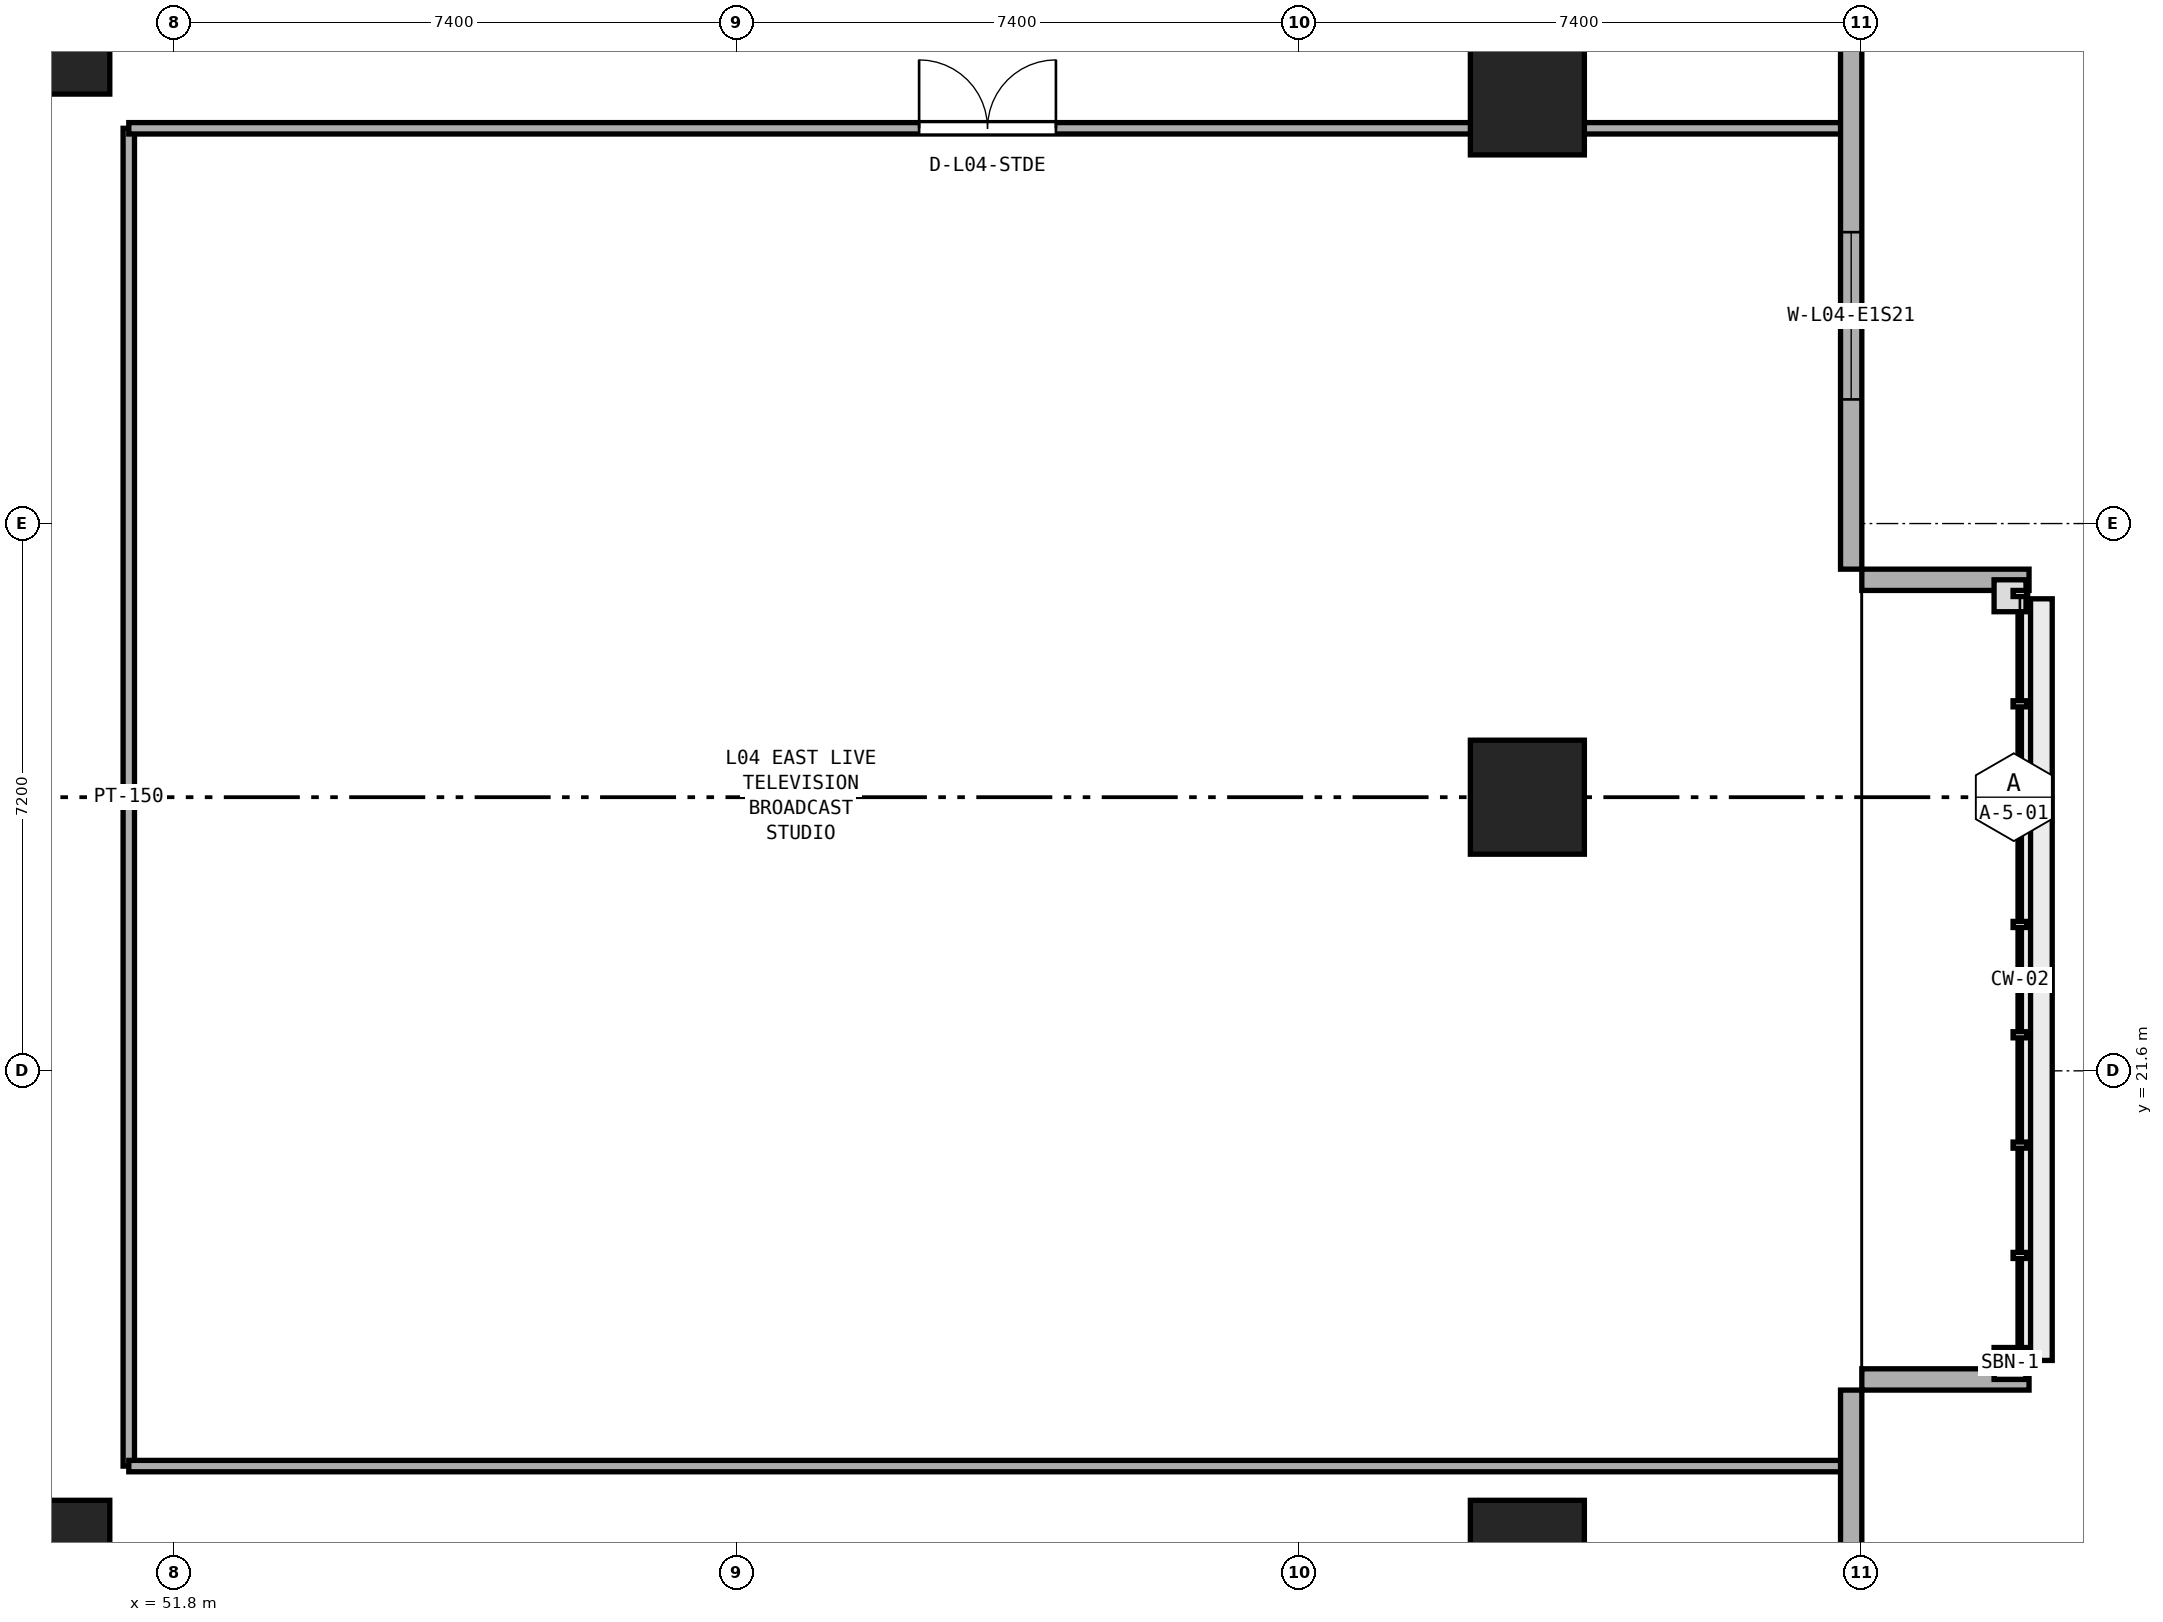
"""IFC4 building model, lengths in metres.
Left out: names, types, materials, properties, quantities, classifications, styles, units other than length and angle.
Written with IfcOpenShell. Run it as: python <this file> out.ifc"""

import sys

from ifc_helpers import new_model, si_unit, direction, frame, frame_2d, origin, origin_2d, place, context, subcontext, project, spatial, rectangle, extrude, element, fill, save


model = new_model("IFC4")
c1 = context("Model", 3, precision=1e-05, world=origin(), true_north=direction((0.0, 1.0)))
c2 = subcontext(c1, "Body", "Model", "MODEL_VIEW")
j1 = project(units=[si_unit("LENGTHUNIT", "METRE"), si_unit("PLANEANGLEUNIT", "RADIAN")], contexts=[c1])
p1 = place(None, origin())
s1 = spatial("IfcSite", under=j1, at=p1, CompositionType="ELEMENT")
p2 = place(p1, origin())
s2 = spatial("IfcBuilding", under=s1, at=p2, CompositionType="ELEMENT")
p3 = place(p2, frame((0.0, 0.0, 20.0)))
s3 = spatial("IfcBuildingStorey", under=s2, at=p3, CompositionType="ELEMENT", Elevation=20.0)
for number, where, z_axis, x_axis in (
    (1, (69.6, 15.2, 0.0), (0.0, 0.0, 1.0), (1.0, 0.0, 0.0)),
    (2, (69.6, 25.2, 0.0), (0.0, 0.0, 1.0), (1.0, 0.0, 0.0)),
    (3, (69.6, 34.4, 0.0), (0.0, 0.0, 1.0), (1.0, 0.0, 0.0)),
    (4, (50.2, 15.2, 0.0), (0.0, 0.0, 1.0), (1.0, 0.0, 0.0)),
    (5, (50.2, 35.2, 0.0), (0.0, 0.0, 1.0), (1.0, 0.0, 0.0)),
):
    element("IfcColumn", number, at=place(p3, frame(where, z_axis=z_axis, x_axis=x_axis)), inside=s3, PredefinedType="COLUMN", context=c2, shape_type="SweptSolid", body=[
        extrude(rectangle(XDim=1.5, YDim=1.5, at=origin_2d()), origin(), (0.0, 0.0, 1.0), 5.0),
    ])
p4 = place(p3, frame((51.2, 16.4, 0.0), z_axis=(0.0, 0.0, 1.0), x_axis=(0.0, 1.0, 0.0)))
e6 = element("IfcWall", 6, at=p4, inside=s3, PredefinedType="PARTITIONING", context=c2, shape_type="SweptSolid", body=[
    extrude(rectangle(XDim=17.6, YDim=0.15, at=frame_2d((8.8, 0.0))), origin(), (0.0, 0.0, 1.0), 4.6),
])
p5 = place(p3, frame((51.2, 16.4, 0.0), z_axis=(0.0, 0.0, 1.0), x_axis=(1.0, 0.0, 0.0)))
e7 = element("IfcWall", 7, at=p5, inside=s3, PredefinedType="PARTITIONING", context=c2, shape_type="SweptSolid", body=[
    extrude(rectangle(XDim=22.595, YDim=0.15, at=frame_2d((11.297, 0.0))), origin(), (0.0, 0.0, 1.0), 2.2),
])
p6 = place(p3, frame((51.2, 34.0, 0.0), z_axis=(0.0, 0.0, 1.0), x_axis=(1.0, 0.0, 0.0)))
e8 = element("IfcWall", 8, at=p6, inside=s3, PredefinedType="PARTITIONING", context=c2, shape_type="SweptSolid", body=[
    extrude(rectangle(XDim=22.595, YDim=0.15, at=frame_2d((11.297, 0.0))), origin(), (0.0, 0.0, 1.0), 2.2),
])
p7 = place(p6, frame((10.397, 0.0, 0.0)))
e9 = element("IfcOpeningElement", 9, at=p7, cuts=e8, PredefinedType="OPENING", context=c2, shape_type="SweptSolid", body=[
    extrude(rectangle(XDim=1.8, YDim=2.15, at=frame_2d((0.9, 1.075))), frame((0.0, 0.085, 0.0), z_axis=(0.0, -1.0, 0.0), x_axis=(1.0, 0.0, 0.0)), (0.0, 0.0, 1.0), 0.17),
])
p8 = place(p3, frame((73.86, 4.2, 0.0), z_axis=(0.0, 0.0, 1.0), x_axis=(0.0, 1.0, 0.0)))
e10 = element("IfcWall", 10, at=p8, inside=s3, PredefinedType="STANDARD", context=c2, shape_type="SweptSolid", body=[
    extrude(rectangle(XDim=13.2, YDim=0.28, at=frame_2d((6.6, 0.0))), origin(), (0.0, 0.0, 1.0), 3.7),
])
p9 = place(p8, frame((1.033, 0.0, 0.9)))
e11 = element("IfcOpeningElement", 11, at=p9, cuts=e10, PredefinedType="OPENING", context=c2, shape_type="SweptSolid", body=[
    extrude(rectangle(XDim=3.0, YDim=2.2, at=frame_2d((1.5, 1.1))), frame((0.0, 0.15, 0.0), z_axis=(0.0, -1.0, 0.0), x_axis=(1.0, 0.0, 0.0)), (0.0, 0.0, 1.0), 0.3),
])
p10 = place(p8, frame((5.1, 0.0, 0.9)))
e12 = element("IfcOpeningElement", 12, at=p10, cuts=e10, PredefinedType="OPENING", context=c2, shape_type="SweptSolid", body=[
    extrude(rectangle(XDim=3.0, YDim=2.2, at=frame_2d((1.5, 1.1))), frame((0.0, 0.15, 0.0), z_axis=(0.0, -1.0, 0.0), x_axis=(1.0, 0.0, 0.0)), (0.0, 0.0, 1.0), 0.3),
])
p11 = place(p3, frame((73.86, 28.2, 0.0), z_axis=(0.0, 0.0, 1.0), x_axis=(0.0, 1.0, 0.0)))
e13 = element("IfcWall", 13, at=p11, inside=s3, PredefinedType="STANDARD", context=c2, shape_type="SweptSolid", body=[
    extrude(rectangle(XDim=18.0, YDim=0.28, at=frame_2d((9.0, 0.0))), origin(), (0.0, 0.0, 1.0), 3.7),
])
p12 = place(p11, frame((2.233, 0.0, 0.9)))
e14 = element("IfcOpeningElement", 14, at=p12, cuts=e13, PredefinedType="OPENING", context=c2, shape_type="SweptSolid", body=[
    extrude(rectangle(XDim=2.2, YDim=1.95, at=frame_2d((1.1, 0.975))), frame((0.0, 0.15, 0.0), z_axis=(0.0, -1.0, 0.0), x_axis=(1.0, 0.0, 0.0)), (0.0, 0.0, 1.0), 0.3),
])
p13 = place(p11, frame((7.9, 0.0, 0.9)))
e15 = element("IfcOpeningElement", 15, at=p13, cuts=e13, PredefinedType="OPENING", context=c2, shape_type="SweptSolid", body=[
    extrude(rectangle(XDim=2.2, YDim=1.95, at=frame_2d((1.1, 0.975))), frame((0.0, 0.15, 0.0), z_axis=(0.0, -1.0, 0.0), x_axis=(1.0, 0.0, 0.0)), (0.0, 0.0, 1.0), 0.3),
])
p14 = place(p11, frame((13.567, 0.0, 0.9)))
e16 = element("IfcOpeningElement", 16, at=p14, cuts=e13, PredefinedType="OPENING", context=c2, shape_type="SweptSolid", body=[
    extrude(rectangle(XDim=2.2, YDim=1.95, at=frame_2d((1.1, 0.975))), frame((0.0, 0.15, 0.0), z_axis=(0.0, -1.0, 0.0), x_axis=(1.0, 0.0, 0.0)), (0.0, 0.0, 1.0), 0.3),
])
p15 = place(p3, frame((74.0, 17.54, 0.0), z_axis=(0.0, 0.0, 1.0), x_axis=(1.0, 0.0, 0.0)))
e17 = element("IfcWall", 17, at=p15, inside=s3, PredefinedType="STANDARD", context=c2, shape_type="SweptSolid", body=[
    extrude(rectangle(XDim=2.2, YDim=0.28, at=frame_2d((1.1, 0.0))), origin(), (0.0, 0.0, 1.0), 4.6),
])
p16 = place(p3, frame((74.0, 28.06, 0.0), z_axis=(0.0, 0.0, 1.0), x_axis=(1.0, 0.0, 0.0)))
e18 = element("IfcWall", 18, at=p16, inside=s3, PredefinedType="STANDARD", context=c2, shape_type="SweptSolid", body=[
    extrude(rectangle(XDim=2.2, YDim=0.28, at=frame_2d((1.1, 0.0))), origin(), (0.0, 0.0, 1.0), 3.907),
])
p17 = place(p7, origin())
e19 = element("IfcDoor", 19, at=p17, inside=s3, OperationType="DOUBLE_DOOR_SINGLE_SWING", PredefinedType="DOOR", context=c2, shape_type="SweptSolid", body=[
    extrude(rectangle(XDim=1.8, YDim=2.15, at=frame_2d((0.9, 1.075))), frame((0.0, 0.025, 0.0), z_axis=(0.0, -1.0, 0.0), x_axis=(1.0, 0.0, 0.0)), (0.0, 0.0, 1.0), 0.05),
])
fill(e9, e19)
p18 = place(p12, origin())
e20 = element("IfcWindow", 20, at=p18, inside=s3, PartitioningType="SINGLE_PANEL", PredefinedType="WINDOW", context=c2, shape_type="SweptSolid", body=[
    extrude(rectangle(XDim=2.2, YDim=1.95, at=frame_2d((1.1, 0.975))), frame((0.0, 0.03, 0.0), z_axis=(0.0, -1.0, 0.0), x_axis=(1.0, 0.0, 0.0)), (0.0, 0.0, 1.0), 0.06),
])
fill(e14, e20)
save(model, sys.argv[1])
